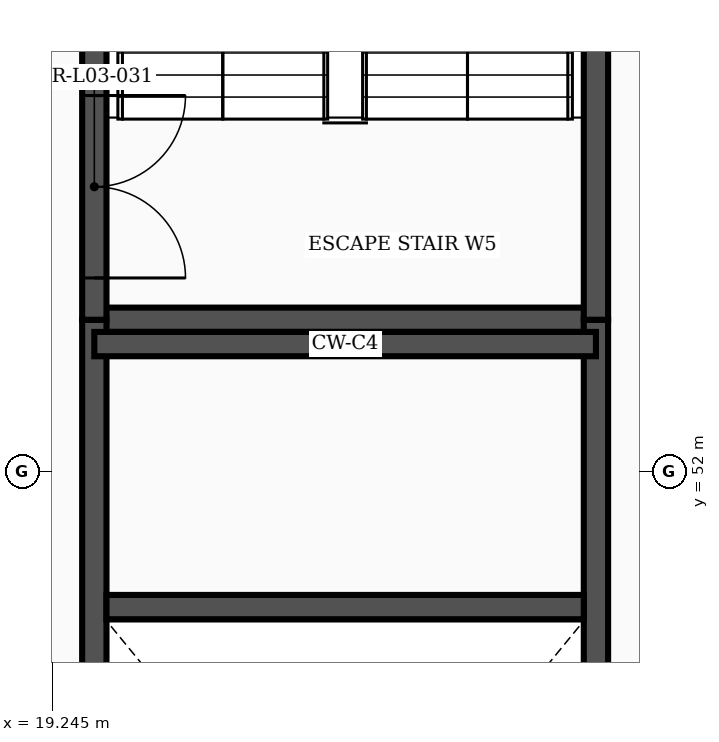
"""IFC4 building model, lengths in metres.
Left out: names, types, materials, properties, quantities, classifications, styles, units other than length and angle.
Written with IfcOpenShell. Run it as: python <this file> out.ifc"""

import sys

from ifc_helpers import new_model, si_unit, direction, frame, frame_2d, origin, place, context, subcontext, project, spatial, rectangle, extrude, element, fill, save


model = new_model("IFC4")
c1 = context("Model", 3, precision=1e-05, world=origin(), true_north=direction((0.0, 1.0)))
c2 = subcontext(c1, "Body", "Model", "MODEL_VIEW")
j1 = project(units=[si_unit("LENGTHUNIT", "METRE"), si_unit("PLANEANGLEUNIT", "RADIAN")], contexts=[c1])
p1 = place(None, origin())
s1 = spatial("IfcSite", under=j1, at=p1, CompositionType="ELEMENT")
p2 = place(p1, origin())
s2 = spatial("IfcBuilding", under=s1, at=p2, CompositionType="ELEMENT")
p3 = place(p2, frame((0.0, 0.0, 16.8)))
s3 = spatial("IfcBuildingStorey", under=s2, at=p3, CompositionType="ELEMENT", Elevation=16.8)
p4 = place(p3, frame((19.8, 54.0, 0.0), z_axis=(0.0, 0.0, 1.0), x_axis=(1.0, 0.0, 0.0)))
e1 = element("IfcWall", 1, at=p4, inside=s3, PredefinedType="SHEAR", context=c2, shape_type="SweptSolid", body=[
    extrude(rectangle(XDim=6.6, YDim=0.32, at=frame_2d((3.3, 0.0))), origin(), (0.0, 0.0, 1.0), 4.555),
])
p5 = place(p3, frame((19.8, 39.4, 0.0), z_axis=(0.0, 0.0, 1.0), x_axis=(0.0, 1.0, 0.0)))
e2 = element("IfcWall", 2, at=p5, inside=s3, PredefinedType="SHEAR", context=c2, shape_type="SweptSolid", body=[
    extrude(rectangle(XDim=14.6, YDim=0.32, at=frame_2d((7.3, 0.0))), origin(), (0.0, 0.0, 1.0), 4.555),
])
p6 = place(p5, frame((0.55, 0.0, 0.0)))
e3 = element("IfcOpeningElement", 3, at=p6, cuts=e2, PredefinedType="OPENING", context=c2, shape_type="SweptSolid", body=[
    extrude(rectangle(XDim=2.4, YDim=2.25, at=frame_2d((1.2, 1.125))), frame((0.0, 0.172, 0.0), z_axis=(0.0, -1.0, 0.0), x_axis=(1.0, 0.0, 0.0)), (0.0, 0.0, 1.0), 0.344),
])
p7 = place(p3, frame((26.4, 39.4, 0.0), z_axis=(0.0, 0.0, 1.0), x_axis=(0.0, 1.0, 0.0)))
e4 = element("IfcWall", 4, at=p7, inside=s3, PredefinedType="SHEAR", context=c2, shape_type="SweptSolid", body=[
    extrude(rectangle(XDim=14.6, YDim=0.32, at=frame_2d((7.3, 0.0))), origin(), (0.0, 0.0, 1.0), 4.555),
])
p8 = place(p3, frame((19.96, 50.22, 0.0), z_axis=(0.0, 0.0, 1.0), x_axis=(1.0, 0.0, 0.0)))
e5 = element("IfcWall", 5, at=p8, inside=s3, PredefinedType="SHEAR", context=c2, shape_type="SweptSolid", body=[
    extrude(rectangle(XDim=6.28, YDim=0.32, at=frame_2d((3.14, 0.0))), origin(), (0.0, 0.0, 1.0), 4.555),
])
p9 = place(p3, frame((19.8, 53.68, 0.0), z_axis=(0.0, 0.0, 1.0), x_axis=(1.0, 0.0, 0.0)))
e6 = element("IfcWall", 6, at=p9, inside=s3, PredefinedType="SHEAR", context=c2, shape_type="SweptSolid", body=[
    extrude(rectangle(XDim=6.6, YDim=0.32, at=frame_2d((3.3, 0.0))), origin(), (0.0, 0.0, 1.0), 4.555),
])
p10 = place(p3, frame((19.8, 54.0, 0.0), z_axis=(0.0, 0.0, 1.0), x_axis=(0.0, 1.0, 0.0)))
e7 = element("IfcWall", 7, at=p10, inside=s3, PredefinedType="SHEAR", context=c2, shape_type="SweptSolid", body=[
    extrude(rectangle(XDim=12.0, YDim=0.32, at=frame_2d((6.0, 0.0))), origin(), (0.0, 0.0, 1.0), 4.555),
])
p11 = place(p10, frame((0.55, 0.0, 0.0)))
e8 = element("IfcOpeningElement", 8, at=p11, cuts=e7, PredefinedType="OPENING", context=c2, shape_type="SweptSolid", body=[
    extrude(rectangle(XDim=2.4, YDim=2.25, at=frame_2d((1.2, 1.125))), frame((0.0, 0.172, 0.0), z_axis=(0.0, -1.0, 0.0), x_axis=(1.0, 0.0, 0.0)), (0.0, 0.0, 1.0), 0.344),
])
p12 = place(p3, frame((26.4, 54.0, 0.0), z_axis=(0.0, 0.0, 1.0), x_axis=(0.0, 1.0, 0.0)))
e9 = element("IfcWall", 9, at=p12, inside=s3, PredefinedType="SHEAR", context=c2, shape_type="SweptSolid", body=[
    extrude(rectangle(XDim=12.0, YDim=0.32, at=frame_2d((6.0, 0.0))), origin(), (0.0, 0.0, 1.0), 4.555),
])
p13 = place(p11, frame((2.4, 0.0, 0.0), z_axis=(0.0, 0.0, 1.0), x_axis=(-1.0, 0.0, 0.0)))
e10 = element("IfcDoor", 10, at=p13, inside=s3, OperationType="DOUBLE_DOOR_SINGLE_SWING", PredefinedType="DOOR", context=c2, shape_type="SweptSolid", body=[
    extrude(rectangle(XDim=2.4, YDim=2.25, at=frame_2d((1.2, 1.125))), frame((0.0, 0.025, 0.0), z_axis=(0.0, -1.0, 0.0), x_axis=(1.0, 0.0, 0.0)), (0.0, 0.0, 1.0), 0.05),
])
fill(e8, e10)
save(model, sys.argv[1])
